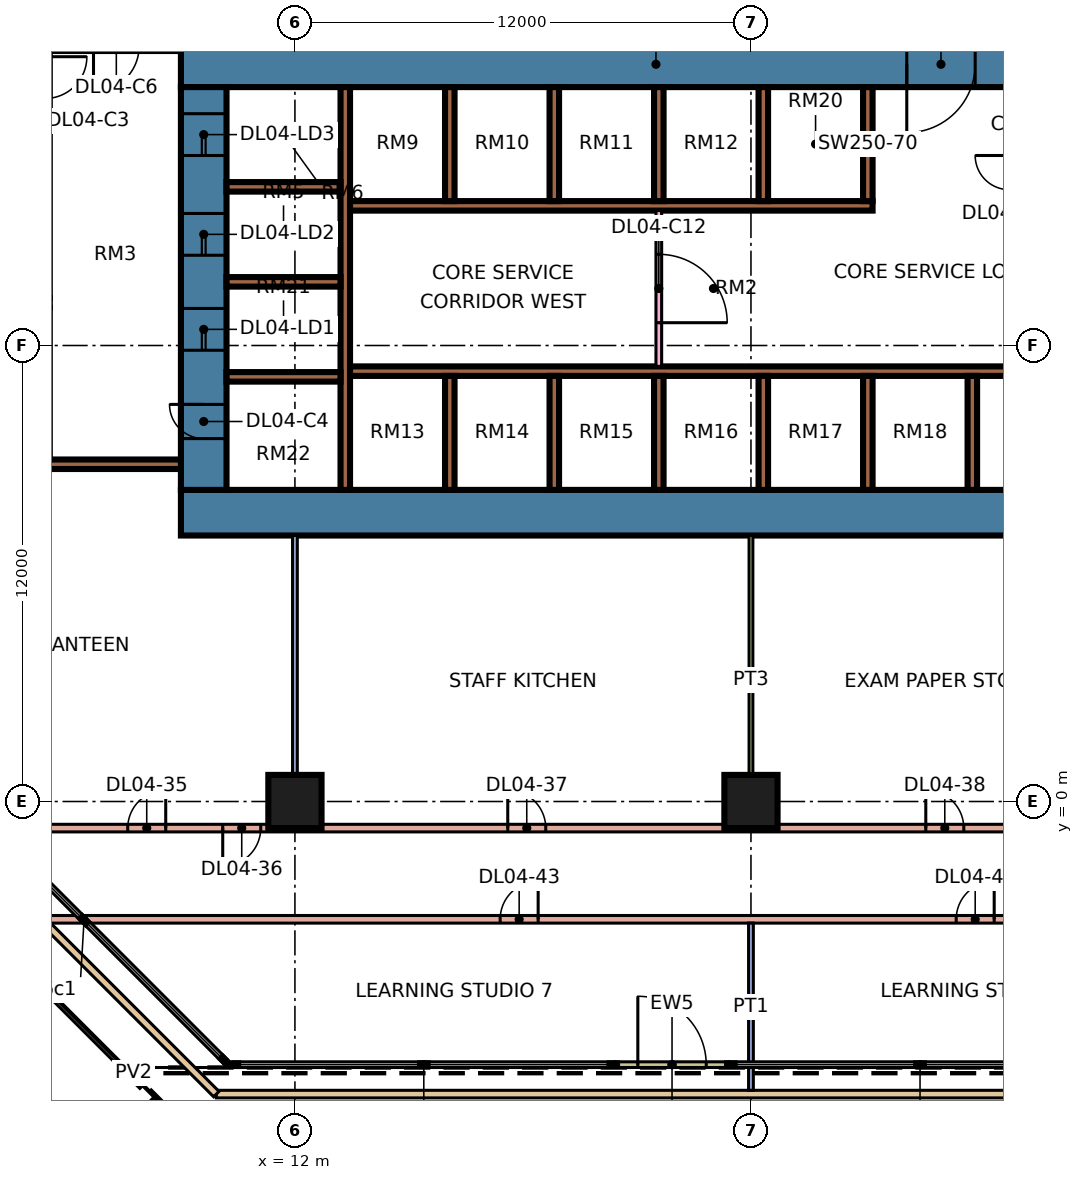
"""IFC4 building model, lengths in metres.
Left out: names, types, materials, properties, quantities, classifications, styles, units other than length and angle.
Written with IfcOpenShell. Run it as: python <this file> out.ifc"""

import sys

from ifc_helpers import new_model, si_unit, direction, frame, frame_2d, origin, origin_2d, place, context, subcontext, project, spatial, rectangle, extrude, element, fill, save


model = new_model("IFC4")
c1 = context("Model", 3, precision=1e-05, world=origin(), true_north=direction((0.0, 1.0)))
c2 = subcontext(c1, "Body", "Model", "MODEL_VIEW")
j1 = project(units=[si_unit("LENGTHUNIT", "METRE"), si_unit("PLANEANGLEUNIT", "RADIAN")], contexts=[c1])
p1 = place(None, origin())
s1 = spatial("IfcSite", under=j1, at=p1, CompositionType="ELEMENT")
p2 = place(p1, origin())
s2 = spatial("IfcBuilding", under=s1, at=p2, CompositionType="ELEMENT")
p3 = place(p2, frame((0.0, 0.0, 21.6)))
s3 = spatial("IfcBuildingStorey", under=s2, at=p3, CompositionType="ELEMENT", Elevation=21.6)
for number, where, z_axis, x_axis in (
    (1, (12.0, 0.0, 0.0), (0.0, 0.0, 1.0), (1.0, 0.0, 0.0)),
    (2, (24.0, 0.0, 0.0), (0.0, 0.0, 1.0), (1.0, 0.0, 0.0)),
):
    element("IfcColumn", number, at=place(p3, frame(where, z_axis=z_axis, x_axis=x_axis)), inside=s3, PredefinedType="COLUMN", context=c2, shape_type="SweptSolid", body=[
        extrude(rectangle(XDim=1.4, YDim=1.4, at=origin_2d()), origin(), (0.0, 0.0, 1.0), 4.8),
    ])
p4 = place(p3, frame((9.0, 7.6, 0.0), z_axis=(0.0, 0.0, 1.0), x_axis=(1.0, 0.0, 0.0)))
e3 = element("IfcWall", 3, at=p4, inside=s3, PredefinedType="SHEAR", context=c2, shape_type="SweptSolid", body=[
    extrude(rectangle(XDim=25.0, YDim=1.2, at=frame_2d((12.5, 0.0))), origin(), (0.0, 0.0, 1.0), 4.8),
])
p5 = place(p3, frame((9.0, 19.4, 0.0), z_axis=(0.0, 0.0, 1.0), x_axis=(1.0, 0.0, 0.0)))
e4 = element("IfcWall", 4, at=p5, inside=s3, PredefinedType="SHEAR", context=c2, shape_type="SweptSolid", body=[
    extrude(rectangle(XDim=25.0, YDim=1.2, at=frame_2d((12.5, 0.0))), origin(), (0.0, 0.0, 1.0), 4.8),
])
p6 = place(p5, frame((19.1, 0.0, 0.0)))
e5 = element("IfcOpeningElement", 5, at=p6, cuts=e4, PredefinedType="OPENING", context=c2, shape_type="SweptSolid", body=[
    extrude(rectangle(XDim=1.8, YDim=2.4, at=frame_2d((0.9, 1.2))), frame((0.0, 0.61, 0.0), z_axis=(0.0, -1.0, 0.0), x_axis=(1.0, 0.0, 0.0)), (0.0, 0.0, 1.0), 1.22),
])
p7 = place(p3, frame((9.6, 8.2, 0.0), z_axis=(0.0, 0.0, 1.0), x_axis=(0.0, 1.0, 0.0)))
e6 = element("IfcWall", 6, at=p7, inside=s3, PredefinedType="SHEAR", context=c2, shape_type="SweptSolid", body=[
    extrude(rectangle(XDim=10.6, YDim=1.2, at=frame_2d((5.3, 0.0))), origin(), (0.0, 0.0, 1.0), 4.8),
])
p8 = place(p7, frame((3.675, 0.0, 0.0)))
e7 = element("IfcOpeningElement", 7, at=p8, cuts=e6, PredefinedType="OPENING", context=c2, shape_type="SweptSolid", body=[
    extrude(rectangle(XDim=1.1, YDim=2.2, at=frame_2d((0.55, 1.1))), frame((0.0, 0.61, 0.0), z_axis=(0.0, -1.0, 0.0), x_axis=(1.0, 0.0, 0.0)), (0.0, 0.0, 1.0), 1.22),
])
p9 = place(p7, frame((6.175, 0.0, 0.0)))
e8 = element("IfcOpeningElement", 8, at=p9, cuts=e6, PredefinedType="OPENING", context=c2, shape_type="SweptSolid", body=[
    extrude(rectangle(XDim=1.1, YDim=2.2, at=frame_2d((0.55, 1.1))), frame((0.0, 0.61, 0.0), z_axis=(0.0, -1.0, 0.0), x_axis=(1.0, 0.0, 0.0)), (0.0, 0.0, 1.0), 1.22),
])
p10 = place(p7, frame((8.8, 0.0, 0.0)))
e9 = element("IfcOpeningElement", 9, at=p10, cuts=e6, PredefinedType="OPENING", context=c2, shape_type="SweptSolid", body=[
    extrude(rectangle(XDim=1.1, YDim=2.2, at=frame_2d((0.55, 1.1))), frame((0.0, 0.61, 0.0), z_axis=(0.0, -1.0, 0.0), x_axis=(1.0, 0.0, 0.0)), (0.0, 0.0, 1.0), 1.22),
])
p11 = place(p7, frame((1.35, 0.0, 0.0)))
e10 = element("IfcOpeningElement", 10, at=p11, cuts=e6, PredefinedType="OPENING", context=c2, shape_type="SweptSolid", body=[
    extrude(rectangle(XDim=0.9, YDim=2.1, at=frame_2d((0.45, 1.05))), frame((0.0, 0.61, 0.0), z_axis=(0.0, -1.0, 0.0), x_axis=(1.0, 0.0, 0.0)), (0.0, 0.0, 1.0), 1.22),
])
p12 = place(p3, frame((13.325, 8.2, 0.0), z_axis=(0.0, 0.0, 1.0), x_axis=(0.0, 1.0, 0.0)))
e11 = element("IfcWall", 11, at=p12, inside=s3, PredefinedType="SHEAR", context=c2, shape_type="SweptSolid", body=[
    extrude(rectangle(XDim=10.6, YDim=0.25, at=frame_2d((5.3, 0.0))), origin(), (0.0, 0.0, 1.0), 4.8),
])
p13 = place(p3, frame((13.45, 11.325, 0.0), z_axis=(0.0, 0.0, 1.0), x_axis=(1.0, 0.0, 0.0)))
e12 = element("IfcWall", 12, at=p13, inside=s3, PredefinedType="SHEAR", context=c2, shape_type="SweptSolid", body=[
    extrude(rectangle(XDim=19.35, YDim=0.25, at=frame_2d((9.675, 0.0))), origin(), (0.0, 0.0, 1.0), 4.8),
])
p14 = place(p3, frame((13.45, 15.675, 0.0), z_axis=(0.0, 0.0, 1.0), x_axis=(1.0, 0.0, 0.0)))
e13 = element("IfcWall", 13, at=p14, inside=s3, PredefinedType="SHEAR", context=c2, shape_type="SweptSolid", body=[
    extrude(rectangle(XDim=13.75, YDim=0.25, at=frame_2d((6.875, 0.0))), origin(), (0.0, 0.0, 1.0), 4.8),
])
for number, where, z_axis, x_axis in (
    (14, (10.2, 11.175, 0.0), (0.0, 0.0, 1.0), (1.0, 0.0, 0.0)),
    (15, (10.2, 13.675, 0.0), (0.0, 0.0, 1.0), (1.0, 0.0, 0.0)),
    (16, (10.2, 16.175, 0.0), (0.0, 0.0, 1.0), (1.0, 0.0, 0.0)),
    (17, (16.075, 8.2, 0.0), (0.0, 0.0, 1.0), (0.0, 1.0, 0.0)),
    (18, (18.825, 8.2, 0.0), (0.0, 0.0, 1.0), (0.0, 1.0, 0.0)),
    (19, (21.575, 8.2, 0.0), (0.0, 0.0, 1.0), (0.0, 1.0, 0.0)),
    (20, (24.325, 8.2, 0.0), (0.0, 0.0, 1.0), (0.0, 1.0, 0.0)),
    (21, (27.075, 8.2, 0.0), (0.0, 0.0, 1.0), (0.0, 1.0, 0.0)),
    (22, (29.825, 8.2, 0.0), (0.0, 0.0, 1.0), (0.0, 1.0, 0.0)),
    (23, (16.075, 15.8, 0.0), (0.0, 0.0, 1.0), (0.0, 1.0, 0.0)),
    (24, (18.825, 15.8, 0.0), (0.0, 0.0, 1.0), (0.0, 1.0, 0.0)),
    (25, (21.575, 15.8, 0.0), (0.0, 0.0, 1.0), (0.0, 1.0, 0.0)),
    (26, (24.325, 15.8, 0.0), (0.0, 0.0, 1.0), (0.0, 1.0, 0.0)),
    (27, (27.075, 15.8, 0.0), (0.0, 0.0, 1.0), (0.0, 1.0, 0.0)),
):
    element("IfcWall", number, at=place(p3, frame(where, z_axis=z_axis, x_axis=x_axis)), inside=s3, PredefinedType="SHEAR", context=c2, shape_type="SweptSolid", body=[
        extrude(rectangle(XDim=3.0, YDim=0.25, at=frame_2d((1.5, 0.0))), origin(), (0.0, 0.0, 1.0), 4.8),
    ])
p15 = place(p3, frame((5.3, 8.875, 0.0), z_axis=(0.0, 0.0, 1.0), x_axis=(1.0, 0.0, 0.0)))
e28 = element("IfcWall", 28, at=p15, inside=s3, PredefinedType="SHEAR", context=c2, shape_type="SweptSolid", body=[
    extrude(rectangle(XDim=3.7, YDim=0.25, at=frame_2d((1.85, 0.0))), origin(), (0.0, 0.0, 1.0), 4.8),
])
p16 = place(p3, frame((20.423, -6.925, 0.0), z_axis=(0.0, 0.0, 1.0), x_axis=(1.0, 0.0, 0.0)))
e29 = element("IfcWall", 29, at=p16, inside=s3, PredefinedType="SOLIDWALL", context=c2, shape_type="SweptSolid", body=[
    extrude(rectangle(XDim=3.0, YDim=0.15, at=frame_2d((1.5, 0.0))), origin(), (0.0, 0.0, 1.0), 4.4),
])
p17 = place(p16, frame((0.6, 0.0, 0.0)))
e30 = element("IfcOpeningElement", 30, at=p17, cuts=e29, PredefinedType="OPENING", context=c2, shape_type="SweptSolid", body=[
    extrude(rectangle(XDim=1.8, YDim=2.4, at=frame_2d((0.9, 1.2))), frame((0.0, 0.085, 0.0), z_axis=(0.0, -1.0, 0.0), x_axis=(1.0, 0.0, 0.0)), (0.0, 0.0, 1.0), 0.17),
])
p18 = place(p3, frame((73.068, -7.7, 0.0), z_axis=(0.0, 0.0, 1.0), x_axis=(-1.0, 0.0, 0.0)))
e31 = element("IfcWall", 31, at=p18, inside=s3, PredefinedType="PARAPET", context=c2, shape_type="SweptSolid", body=[
    extrude(rectangle(XDim=63.136, YDim=0.2, at=frame_2d((31.568, 0.0))), origin(), (0.0, 0.0, 1.0), 0.5),
])
p19 = place(p3, frame((9.932, -7.7, 0.0), z_axis=(0.0, 0.0, 1.0), x_axis=(-0.707106781187, 0.707106781187, 0.0)))
e32 = element("IfcWall", 32, at=p19, inside=s3, PredefinedType="PARAPET", context=c2, shape_type="SweptSolid", body=[
    extrude(rectangle(XDim=24.935, YDim=0.2, at=frame_2d((12.468, 0.0))), origin(), (0.0, 0.0, 1.0), 0.5),
])
p20 = place(p3, frame((21.575, 11.45, 0.0), z_axis=(0.0, 0.0, 1.0), x_axis=(0.0, 1.0, 0.0)))
e33 = element("IfcWall", 33, at=p20, inside=s3, PredefinedType="PARTITIONING", context=c2, shape_type="SweptSolid", body=[
    extrude(rectangle(XDim=4.1, YDim=0.15, at=frame_2d((2.05, 0.0))), origin(), (0.0, 0.0, 1.0), 4.4),
])
p21 = place(p20, frame((1.15, 0.0, 0.0)))
e34 = element("IfcOpeningElement", 34, at=p21, cuts=e33, PredefinedType="OPENING", context=c2, shape_type="SweptSolid", body=[
    extrude(rectangle(XDim=1.8, YDim=2.4, at=frame_2d((0.9, 1.2))), frame((0.0, 0.085, 0.0), z_axis=(0.0, -1.0, 0.0), x_axis=(1.0, 0.0, 0.0)), (0.0, 0.0, 1.0), 0.17),
])
p22 = place(p3, frame((3.073, -0.7, 0.0), z_axis=(0.0, 0.0, 1.0), x_axis=(1.0, 0.0, 0.0)))
e35 = element("IfcWall", 35, at=p22, inside=s3, PredefinedType="PARTITIONING", context=c2, shape_type="SweptSolid", body=[
    extrude(rectangle(XDim=41.927, YDim=0.2, at=frame_2d((20.963, 0.0))), origin(), (0.0, 0.0, 1.0), 4.4),
])
p23 = place(p22, frame((36.027, 0.0, 0.0)))
e36 = element("IfcOpeningElement", 36, at=p23, cuts=e35, PredefinedType="OPENING", context=c2, shape_type="SweptSolid", body=[
    extrude(rectangle(XDim=1.0, YDim=2.1, at=frame_2d((0.5, 1.05))), frame((0.0, 0.11, 0.0), z_axis=(0.0, -1.0, 0.0), x_axis=(1.0, 0.0, 0.0)), (0.0, 0.0, 1.0), 0.22),
])
p24 = place(p22, frame((4.527, 0.0, 0.0)))
e37 = element("IfcOpeningElement", 37, at=p24, cuts=e35, PredefinedType="OPENING", context=c2, shape_type="SweptSolid", body=[
    extrude(rectangle(XDim=1.0, YDim=2.1, at=frame_2d((0.5, 1.05))), frame((0.0, 0.11, 0.0), z_axis=(0.0, -1.0, 0.0), x_axis=(1.0, 0.0, 0.0)), (0.0, 0.0, 1.0), 0.22),
])
p25 = place(p22, frame((7.027, 0.0, 0.0)))
e38 = element("IfcOpeningElement", 38, at=p25, cuts=e35, PredefinedType="OPENING", context=c2, shape_type="SweptSolid", body=[
    extrude(rectangle(XDim=1.0, YDim=2.1, at=frame_2d((0.5, 1.05))), frame((0.0, 0.11, 0.0), z_axis=(0.0, -1.0, 0.0), x_axis=(1.0, 0.0, 0.0)), (0.0, 0.0, 1.0), 0.22),
])
p26 = place(p22, frame((14.527, 0.0, 0.0)))
e39 = element("IfcOpeningElement", 39, at=p26, cuts=e35, PredefinedType="OPENING", context=c2, shape_type="SweptSolid", body=[
    extrude(rectangle(XDim=1.0, YDim=2.1, at=frame_2d((0.5, 1.05))), frame((0.0, 0.11, 0.0), z_axis=(0.0, -1.0, 0.0), x_axis=(1.0, 0.0, 0.0)), (0.0, 0.0, 1.0), 0.22),
])
p27 = place(p22, frame((25.527, 0.0, 0.0)))
e40 = element("IfcOpeningElement", 40, at=p27, cuts=e35, PredefinedType="OPENING", context=c2, shape_type="SweptSolid", body=[
    extrude(rectangle(XDim=1.0, YDim=2.1, at=frame_2d((0.5, 1.05))), frame((0.0, 0.11, 0.0), z_axis=(0.0, -1.0, 0.0), x_axis=(1.0, 0.0, 0.0)), (0.0, 0.0, 1.0), 0.22),
])
p28 = place(p3, frame((5.473, -3.1, 0.0), z_axis=(0.0, 0.0, 1.0), x_axis=(1.0, 0.0, 0.0)))
e41 = element("IfcWall", 41, at=p28, inside=s3, PredefinedType="PARTITIONING", context=c2, shape_type="SweptSolid", body=[
    extrude(rectangle(XDim=69.727, YDim=0.2, at=frame_2d((34.863, 0.0))), origin(), (0.0, 0.0, 1.0), 4.4),
])
p29 = place(p28, frame((11.927, 0.0, 0.0)))
e42 = element("IfcOpeningElement", 42, at=p29, cuts=e41, PredefinedType="OPENING", context=c2, shape_type="SweptSolid", body=[
    extrude(rectangle(XDim=1.0, YDim=2.1, at=frame_2d((0.5, 1.05))), frame((0.0, 0.11, 0.0), z_axis=(0.0, -1.0, 0.0), x_axis=(1.0, 0.0, 0.0)), (0.0, 0.0, 1.0), 0.22),
])
p30 = place(p28, frame((23.927, 0.0, 0.0)))
e43 = element("IfcOpeningElement", 43, at=p30, cuts=e41, PredefinedType="OPENING", context=c2, shape_type="SweptSolid", body=[
    extrude(rectangle(XDim=1.0, YDim=2.1, at=frame_2d((0.5, 1.05))), frame((0.0, 0.11, 0.0), z_axis=(0.0, -1.0, 0.0), x_axis=(1.0, 0.0, 0.0)), (0.0, 0.0, 1.0), 0.22),
])
p31 = place(p28, frame((34.427, 0.0, 0.0)))
e44 = element("IfcOpeningElement", 44, at=p31, cuts=e41, PredefinedType="OPENING", context=c2, shape_type="SweptSolid", body=[
    extrude(rectangle(XDim=1.0, YDim=2.1, at=frame_2d((0.5, 1.05))), frame((0.0, 0.11, 0.0), z_axis=(0.0, -1.0, 0.0), x_axis=(1.0, 0.0, 0.0)), (0.0, 0.0, 1.0), 0.22),
])
p32 = place(p28, frame((43.427, 0.0, 0.0)))
e45 = element("IfcOpeningElement", 45, at=p32, cuts=e41, PredefinedType="OPENING", context=c2, shape_type="SweptSolid", body=[
    extrude(rectangle(XDim=1.0, YDim=2.1, at=frame_2d((0.5, 1.05))), frame((0.0, 0.11, 0.0), z_axis=(0.0, -1.0, 0.0), x_axis=(1.0, 0.0, 0.0)), (0.0, 0.0, 1.0), 0.22),
])
p33 = place(p28, frame((52.427, 0.0, 0.0)))
e46 = element("IfcOpeningElement", 46, at=p33, cuts=e41, PredefinedType="OPENING", context=c2, shape_type="SweptSolid", body=[
    extrude(rectangle(XDim=1.0, YDim=2.1, at=frame_2d((0.5, 1.05))), frame((0.0, 0.11, 0.0), z_axis=(0.0, -1.0, 0.0), x_axis=(1.0, 0.0, 0.0)), (0.0, 0.0, 1.0), 0.22),
])
p34 = place(p28, frame((61.427, 0.0, 0.0)))
e47 = element("IfcOpeningElement", 47, at=p34, cuts=e41, PredefinedType="OPENING", context=c2, shape_type="SweptSolid", body=[
    extrude(rectangle(XDim=1.0, YDim=2.1, at=frame_2d((0.5, 1.05))), frame((0.0, 0.11, 0.0), z_axis=(0.0, -1.0, 0.0), x_axis=(1.0, 0.0, 0.0)), (0.0, 0.0, 1.0), 0.22),
])
p35 = place(p3, frame((12.0, -0.6, 0.0), z_axis=(0.0, 0.0, 1.0), x_axis=(0.0, 1.0, 0.0)))
e48 = element("IfcWall", 48, at=p35, inside=s3, PredefinedType="PARTITIONING", context=c2, shape_type="SweptSolid", body=[
    extrude(rectangle(XDim=7.6, YDim=0.125, at=frame_2d((3.8, 0.0))), origin(), (0.0, 0.0, 1.0), 4.4),
])
p36 = place(p3, frame((24.0, -7.6, 0.0), z_axis=(0.0, 0.0, 1.0), x_axis=(0.0, 1.0, 0.0)))
e49 = element("IfcWall", 49, at=p36, inside=s3, PredefinedType="PARTITIONING", context=c2, shape_type="SweptSolid", body=[
    extrude(rectangle(XDim=4.4, YDim=0.125, at=frame_2d((2.2, 0.0))), origin(), (0.0, 0.0, 1.0), 4.4),
])
p37 = place(p3, frame((24.0, -0.6, 0.0), z_axis=(0.0, 0.0, 1.0), x_axis=(0.0, 1.0, 0.0)))
e50 = element("IfcWall", 50, at=p37, inside=s3, PredefinedType="PARTITIONING", context=c2, shape_type="SweptSolid", body=[
    extrude(rectangle(XDim=7.6, YDim=0.1, at=frame_2d((3.8, 0.0))), origin(), (0.0, 0.0, 1.0), 4.4),
])
p38 = place(p17, origin())
e51 = element("IfcDoor", 51, at=p38, inside=s3, OperationType="DOUBLE_DOOR_SINGLE_SWING", PredefinedType="DOOR", context=c2, shape_type="SweptSolid", body=[
    extrude(rectangle(XDim=1.8, YDim=2.4, at=frame_2d((0.9, 1.2))), frame((0.0, 0.025, 0.0), z_axis=(0.0, -1.0, 0.0), x_axis=(1.0, 0.0, 0.0)), (0.0, 0.0, 1.0), 0.05),
])
fill(e30, e51)
p39 = place(p8, origin())
e52 = element("IfcDoor", 52, at=p39, inside=s3, OperationType="DOUBLE_DOOR_SLIDING", PredefinedType="DOOR", context=c2, shape_type="SweptSolid", body=[
    extrude(rectangle(XDim=1.1, YDim=2.2, at=frame_2d((0.55, 1.1))), frame((0.0, 0.025, 0.0), z_axis=(0.0, -1.0, 0.0), x_axis=(1.0, 0.0, 0.0)), (0.0, 0.0, 1.0), 0.05),
])
fill(e7, e52)
p40 = place(p9, origin())
e53 = element("IfcDoor", 53, at=p40, inside=s3, OperationType="DOUBLE_DOOR_SLIDING", PredefinedType="DOOR", context=c2, shape_type="SweptSolid", body=[
    extrude(rectangle(XDim=1.1, YDim=2.2, at=frame_2d((0.55, 1.1))), frame((0.0, 0.025, 0.0), z_axis=(0.0, -1.0, 0.0), x_axis=(1.0, 0.0, 0.0)), (0.0, 0.0, 1.0), 0.05),
])
fill(e8, e53)
p41 = place(p10, origin())
e54 = element("IfcDoor", 54, at=p41, inside=s3, OperationType="DOUBLE_DOOR_SLIDING", PredefinedType="DOOR", context=c2, shape_type="SweptSolid", body=[
    extrude(rectangle(XDim=1.1, YDim=2.2, at=frame_2d((0.55, 1.1))), frame((0.0, 0.025, 0.0), z_axis=(0.0, -1.0, 0.0), x_axis=(1.0, 0.0, 0.0)), (0.0, 0.0, 1.0), 0.05),
])
fill(e9, e54)
p42 = place(p6, frame((1.8, 0.0, 0.0), z_axis=(0.0, 0.0, 1.0), x_axis=(-1.0, 0.0, 0.0)))
e55 = element("IfcDoor", 55, at=p42, inside=s3, OperationType="DOUBLE_DOOR_SINGLE_SWING", PredefinedType="DOOR", context=c2, shape_type="SweptSolid", body=[
    extrude(rectangle(XDim=1.8, YDim=2.4, at=frame_2d((0.9, 1.2))), frame((0.0, 0.025, 0.0), z_axis=(0.0, -1.0, 0.0), x_axis=(1.0, 0.0, 0.0)), (0.0, 0.0, 1.0), 0.05),
])
fill(e5, e55)
p43 = place(p11, frame((0.9, 0.0, 0.0), z_axis=(0.0, 0.0, 1.0), x_axis=(-1.0, 0.0, 0.0)))
e56 = element("IfcDoor", 56, at=p43, inside=s3, OperationType="SINGLE_SWING_RIGHT", PredefinedType="DOOR", context=c2, shape_type="SweptSolid", body=[
    extrude(rectangle(XDim=0.9, YDim=2.1, at=frame_2d((0.45, 1.05))), frame((0.0, 0.025, 0.0), z_axis=(0.0, -1.0, 0.0), x_axis=(1.0, 0.0, 0.0)), (0.0, 0.0, 1.0), 0.05),
])
fill(e10, e56)
p44 = place(p21, frame((1.8, 0.0, 0.0), z_axis=(0.0, 0.0, 1.0), x_axis=(-1.0, 0.0, 0.0)))
e57 = element("IfcDoor", 57, at=p44, inside=s3, OperationType="DOUBLE_DOOR_SINGLE_SWING", PredefinedType="DOOR", context=c2, shape_type="SweptSolid", body=[
    extrude(rectangle(XDim=1.8, YDim=2.4, at=frame_2d((0.9, 1.2))), frame((0.0, 0.025, 0.0), z_axis=(0.0, -1.0, 0.0), x_axis=(1.0, 0.0, 0.0)), (0.0, 0.0, 1.0), 0.05),
])
fill(e34, e57)
p45 = place(p24, frame((1.0, 0.0, 0.0), z_axis=(0.0, 0.0, 1.0), x_axis=(-1.0, 0.0, 0.0)))
e58 = element("IfcDoor", 58, at=p45, inside=s3, OperationType="SINGLE_SWING_RIGHT", PredefinedType="DOOR", context=c2, shape_type="SweptSolid", body=[
    extrude(rectangle(XDim=1.0, YDim=2.1, at=frame_2d((0.5, 1.05))), frame((0.0, 0.025, 0.0), z_axis=(0.0, -1.0, 0.0), x_axis=(1.0, 0.0, 0.0)), (0.0, 0.0, 1.0), 0.05),
])
fill(e37, e58)
p46 = place(p25, frame((1.0, 0.0, 0.0), z_axis=(0.0, 0.0, 1.0), x_axis=(-1.0, 0.0, 0.0)))
e59 = element("IfcDoor", 59, at=p46, inside=s3, OperationType="SINGLE_SWING_LEFT", PredefinedType="DOOR", context=c2, shape_type="SweptSolid", body=[
    extrude(rectangle(XDim=1.0, YDim=2.1, at=frame_2d((0.5, 1.05))), frame((0.0, 0.025, 0.0), z_axis=(0.0, -1.0, 0.0), x_axis=(1.0, 0.0, 0.0)), (0.0, 0.0, 1.0), 0.05),
])
fill(e38, e59)
p47 = place(p26, origin())
e60 = element("IfcDoor", 60, at=p47, inside=s3, OperationType="SINGLE_SWING_LEFT", PredefinedType="DOOR", context=c2, shape_type="SweptSolid", body=[
    extrude(rectangle(XDim=1.0, YDim=2.1, at=frame_2d((0.5, 1.05))), frame((0.0, 0.025, 0.0), z_axis=(0.0, -1.0, 0.0), x_axis=(1.0, 0.0, 0.0)), (0.0, 0.0, 1.0), 0.05),
])
fill(e39, e60)
p48 = place(p27, origin())
e61 = element("IfcDoor", 61, at=p48, inside=s3, OperationType="SINGLE_SWING_LEFT", PredefinedType="DOOR", context=c2, shape_type="SweptSolid", body=[
    extrude(rectangle(XDim=1.0, YDim=2.1, at=frame_2d((0.5, 1.05))), frame((0.0, 0.025, 0.0), z_axis=(0.0, -1.0, 0.0), x_axis=(1.0, 0.0, 0.0)), (0.0, 0.0, 1.0), 0.05),
])
fill(e40, e61)
p49 = place(p29, frame((1.0, 0.0, 0.0), z_axis=(0.0, 0.0, 1.0), x_axis=(-1.0, 0.0, 0.0)))
e62 = element("IfcDoor", 62, at=p49, inside=s3, OperationType="SINGLE_SWING_RIGHT", PredefinedType="DOOR", context=c2, shape_type="SweptSolid", body=[
    extrude(rectangle(XDim=1.0, YDim=2.1, at=frame_2d((0.5, 1.05))), frame((0.0, 0.025, 0.0), z_axis=(0.0, -1.0, 0.0), x_axis=(1.0, 0.0, 0.0)), (0.0, 0.0, 1.0), 0.05),
])
fill(e42, e62)
p50 = place(p30, frame((1.0, 0.0, 0.0), z_axis=(0.0, 0.0, 1.0), x_axis=(-1.0, 0.0, 0.0)))
e63 = element("IfcDoor", 63, at=p50, inside=s3, OperationType="SINGLE_SWING_RIGHT", PredefinedType="DOOR", context=c2, shape_type="SweptSolid", body=[
    extrude(rectangle(XDim=1.0, YDim=2.1, at=frame_2d((0.5, 1.05))), frame((0.0, 0.025, 0.0), z_axis=(0.0, -1.0, 0.0), x_axis=(1.0, 0.0, 0.0)), (0.0, 0.0, 1.0), 0.05),
])
fill(e43, e63)
save(model, sys.argv[1])
